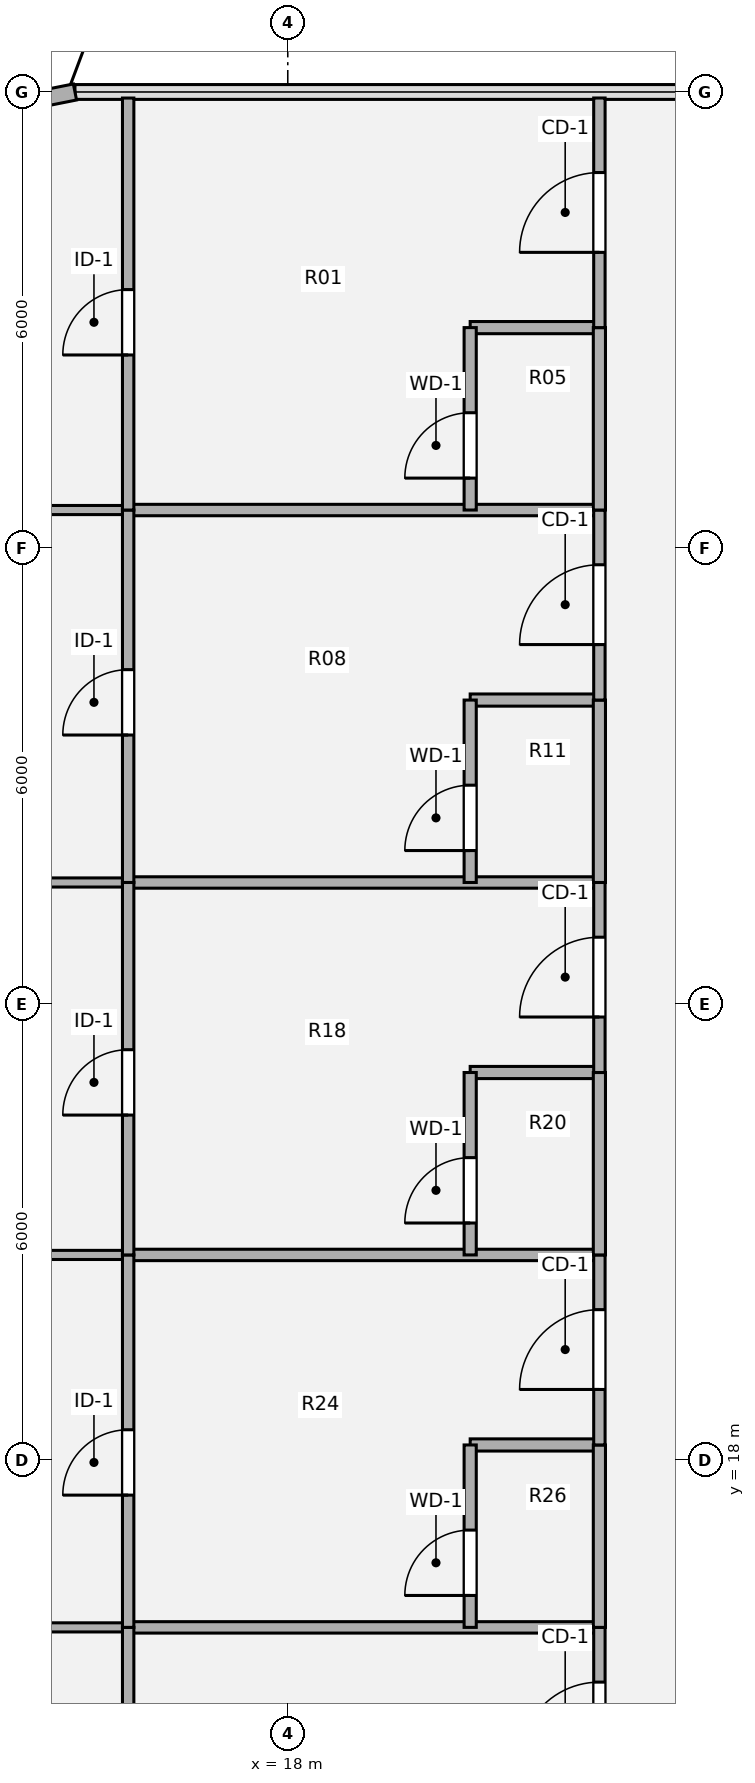
"""IFC4 building model, lengths in metres.
Left out: names, types, materials, properties, quantities, classifications, styles, units other than length and angle.
Written with IfcOpenShell. Run it as: python <this file> out.ifc"""

import sys

from ifc_helpers import new_model, si_unit, direction, frame, frame_2d, origin, origin_2d, place, context, subcontext, project, spatial, rectangle, extrude, source, transform, mapped, element, fill, save


model = new_model("IFC4")
c1 = context("Model", 3, precision=1e-05, world=origin(), true_north=direction((0.0, 1.0)))
c2 = subcontext(c1, "Body", "Model", "MODEL_VIEW")
j1 = project(units=[si_unit("LENGTHUNIT", "METRE"), si_unit("PLANEANGLEUNIT", "RADIAN")], contexts=[c1])
p1 = place(None, origin())
s1 = spatial("IfcSite", under=j1, at=p1, CompositionType="ELEMENT")
p2 = place(p1, origin())
s2 = spatial("IfcBuilding", under=s1, at=p2, CompositionType="ELEMENT")
p3 = place(p2, frame((0.0, 0.0, 68.58)))
s3 = spatial("IfcBuildingStorey", under=s2, at=p3, CompositionType="ELEMENT", Elevation=68.58)
p4 = place(p3, frame((13.975, 35.756, 0.0), z_axis=(0.0, 0.0, 1.0), x_axis=(0.980775717779, 0.195138390419, 0.0)))
e1 = element("IfcWall", 1, at=p4, inside=s3, PredefinedType="SOLIDWALL", context=c2, shape_type="SweptSolid", body=[
    extrude(rectangle(XDim=1.249, YDim=0.215, at=frame_2d((0.624, 0.0))), origin(), (0.0, 0.0, 1.0), 3.53),
])
p5 = place(p3, frame((12.08, 15.8, 0.0), z_axis=(0.0, 0.0, 1.0), x_axis=(1.0, 0.0, 0.0)))
e2 = element("IfcWall", 2, at=p5, inside=s3, PredefinedType="PARTITIONING", context=c2, shape_type="SweptSolid", body=[
    extrude(rectangle(XDim=3.82, YDim=0.12, at=frame_2d((1.91, 0.0))), origin(), (0.0, 0.0, 1.0), 3.5),
])
p6 = place(p3, frame((15.9, 15.8, 0.0), z_axis=(0.0, 0.0, 1.0), x_axis=(1.0, 0.0, 0.0)))
e3 = element("IfcWall", 3, at=p6, inside=s3, PredefinedType="PARTITIONING", context=c2, shape_type="SweptSolid", body=[
    extrude(rectangle(XDim=6.2, YDim=0.15, at=frame_2d((3.1, 0.0))), origin(), (0.0, 0.0, 1.0), 3.5),
])
p7 = place(p3, frame((20.4, 18.2, 0.0), z_axis=(0.0, 0.0, 1.0), x_axis=(1.0, 0.0, 0.0)))
e4 = element("IfcWall", 4, at=p7, inside=s3, PredefinedType="PLUMBINGWALL", context=c2, shape_type="SweptSolid", body=[
    extrude(rectangle(XDim=1.7, YDim=0.16, at=frame_2d((0.85, 0.0))), origin(), (0.0, 0.0, 1.0), 2.715),
])
p8 = place(p3, frame((12.08, 20.7, 0.0), z_axis=(0.0, 0.0, 1.0), x_axis=(1.0, 0.0, 0.0)))
e5 = element("IfcWall", 5, at=p8, inside=s3, PredefinedType="PARTITIONING", context=c2, shape_type="SweptSolid", body=[
    extrude(rectangle(XDim=3.82, YDim=0.12, at=frame_2d((1.91, 0.0))), origin(), (0.0, 0.0, 1.0), 2.982),
])
p9 = place(p3, frame((15.9, 20.7, 0.0), z_axis=(0.0, 0.0, 1.0), x_axis=(1.0, 0.0, 0.0)))
e6 = element("IfcWall", 6, at=p9, inside=s3, PredefinedType="PARTITIONING", context=c2, shape_type="SweptSolid", body=[
    extrude(rectangle(XDim=6.2, YDim=0.15, at=frame_2d((3.1, 0.0))), origin(), (0.0, 0.0, 1.0), 2.982),
])
p10 = place(p3, frame((20.4, 23.1, 0.0), z_axis=(0.0, 0.0, 1.0), x_axis=(1.0, 0.0, 0.0)))
e7 = element("IfcWall", 7, at=p10, inside=s3, PredefinedType="PLUMBINGWALL", context=c2, shape_type="SweptSolid", body=[
    extrude(rectangle(XDim=1.7, YDim=0.16, at=frame_2d((0.85, 0.0))), origin(), (0.0, 0.0, 1.0), 3.055),
])
p11 = place(p3, frame((12.08, 25.6, 0.0), z_axis=(0.0, 0.0, 1.0), x_axis=(1.0, 0.0, 0.0)))
e8 = element("IfcWall", 8, at=p11, inside=s3, PredefinedType="PARTITIONING", context=c2, shape_type="SweptSolid", body=[
    extrude(rectangle(XDim=3.82, YDim=0.12, at=frame_2d((1.91, 0.0))), origin(), (0.0, 0.0, 1.0), 2.982),
])
p12 = place(p3, frame((15.9, 25.6, 0.0), z_axis=(0.0, 0.0, 1.0), x_axis=(1.0, 0.0, 0.0)))
e9 = element("IfcWall", 9, at=p12, inside=s3, PredefinedType="PARTITIONING", context=c2, shape_type="SweptSolid", body=[
    extrude(rectangle(XDim=6.2, YDim=0.15, at=frame_2d((3.1, 0.0))), origin(), (0.0, 0.0, 1.0), 2.982),
])
p13 = place(p3, frame((20.4, 28.0, 0.0), z_axis=(0.0, 0.0, 1.0), x_axis=(1.0, 0.0, 0.0)))
e10 = element("IfcWall", 10, at=p13, inside=s3, PredefinedType="PLUMBINGWALL", context=c2, shape_type="SweptSolid", body=[
    extrude(rectangle(XDim=1.7, YDim=0.16, at=frame_2d((0.85, 0.0))), origin(), (0.0, 0.0, 1.0), 2.982),
])
p14 = place(p3, frame((12.08, 30.5, 0.0), z_axis=(0.0, 0.0, 1.0), x_axis=(1.0, 0.0, 0.0)))
e11 = element("IfcWall", 11, at=p14, inside=s3, PredefinedType="PARTITIONING", context=c2, shape_type="SweptSolid", body=[
    extrude(rectangle(XDim=3.82, YDim=0.12, at=frame_2d((1.91, 0.0))), origin(), (0.0, 0.0, 1.0), 2.903),
])
p15 = place(p3, frame((15.9, 30.5, 0.0), z_axis=(0.0, 0.0, 1.0), x_axis=(1.0, 0.0, 0.0)))
e12 = element("IfcWall", 12, at=p15, inside=s3, PredefinedType="PARTITIONING", context=c2, shape_type="SweptSolid", body=[
    extrude(rectangle(XDim=6.2, YDim=0.15, at=frame_2d((3.1, 0.0))), origin(), (0.0, 0.0, 1.0), 2.903),
])
p16 = place(p3, frame((20.4, 32.9, 0.0), z_axis=(0.0, 0.0, 1.0), x_axis=(1.0, 0.0, 0.0)))
e13 = element("IfcWall", 13, at=p16, inside=s3, PredefinedType="PLUMBINGWALL", context=c2, shape_type="SweptSolid", body=[
    extrude(rectangle(XDim=1.7, YDim=0.16, at=frame_2d((0.85, 0.0))), origin(), (0.0, 0.0, 1.0), 3.055),
])
p17 = place(p3, frame((15.9, 10.9, 0.0), z_axis=(0.0, 0.0, 1.0), x_axis=(0.0, 1.0, 0.0)))
e14 = element("IfcWall", 14, at=p17, inside=s3, PredefinedType="PARTITIONING", context=c2, shape_type="SweptSolid", body=[
    extrude(rectangle(XDim=4.9, YDim=0.15, at=frame_2d((2.45, 0.0))), origin(), (0.0, 0.0, 1.0), 3.5),
])
p18 = place(p17, frame((1.64, 0.0, 0.0)))
e15 = element("IfcOpeningElement", 15, at=p18, cuts=e14, PredefinedType="OPENING", context=c2, shape_type="SweptSolid", body=[
    extrude(rectangle(XDim=0.86, YDim=2.1, at=origin_2d()), frame((0.43, 0.085, 1.05), z_axis=(0.0, -1.0, 0.0), x_axis=(1.0, 0.0, 0.0)), (0.0, 0.0, 1.0), 0.17),
])
p19 = place(p3, frame((15.9, 15.8, 0.0), z_axis=(0.0, 0.0, 1.0), x_axis=(0.0, 1.0, 0.0)))
e16 = element("IfcWall", 16, at=p19, inside=s3, PredefinedType="PARTITIONING", context=c2, shape_type="SweptSolid", body=[
    extrude(rectangle(XDim=4.9, YDim=0.15, at=frame_2d((2.45, 0.0))), origin(), (0.0, 0.0, 1.0), 3.5),
])
p20 = place(p19, frame((1.74, 0.0, 0.0)))
e17 = element("IfcOpeningElement", 17, at=p20, cuts=e16, PredefinedType="OPENING", context=c2, shape_type="SweptSolid", body=[
    extrude(rectangle(XDim=0.86, YDim=2.1, at=origin_2d()), frame((0.43, 0.085, 1.05), z_axis=(0.0, -1.0, 0.0), x_axis=(1.0, 0.0, 0.0)), (0.0, 0.0, 1.0), 0.17),
])
p21 = place(p3, frame((15.9, 20.7, 0.0), z_axis=(0.0, 0.0, 1.0), x_axis=(0.0, 1.0, 0.0)))
e18 = element("IfcWall", 18, at=p21, inside=s3, PredefinedType="PARTITIONING", context=c2, shape_type="SweptSolid", body=[
    extrude(rectangle(XDim=4.9, YDim=0.15, at=frame_2d((2.45, 0.0))), origin(), (0.0, 0.0, 1.0), 3.5),
])
p22 = place(p21, frame((1.84, 0.0, 0.0)))
e19 = element("IfcOpeningElement", 19, at=p22, cuts=e18, PredefinedType="OPENING", context=c2, shape_type="SweptSolid", body=[
    extrude(rectangle(XDim=0.86, YDim=2.1, at=origin_2d()), frame((0.43, 0.085, 1.05), z_axis=(0.0, -1.0, 0.0), x_axis=(1.0, 0.0, 0.0)), (0.0, 0.0, 1.0), 0.17),
])
p23 = place(p3, frame((15.9, 25.6, 0.0), z_axis=(0.0, 0.0, 1.0), x_axis=(0.0, 1.0, 0.0)))
e20 = element("IfcWall", 20, at=p23, inside=s3, PredefinedType="PARTITIONING", context=c2, shape_type="SweptSolid", body=[
    extrude(rectangle(XDim=4.9, YDim=0.15, at=frame_2d((2.45, 0.0))), origin(), (0.0, 0.0, 1.0), 3.5),
])
p24 = place(p23, frame((1.94, 0.0, 0.0)))
e21 = element("IfcOpeningElement", 21, at=p24, cuts=e20, PredefinedType="OPENING", context=c2, shape_type="SweptSolid", body=[
    extrude(rectangle(XDim=0.86, YDim=2.1, at=origin_2d()), frame((0.43, 0.085, 1.05), z_axis=(0.0, -1.0, 0.0), x_axis=(1.0, 0.0, 0.0)), (0.0, 0.0, 1.0), 0.17),
])
p25 = place(p3, frame((15.9, 30.5, 0.0), z_axis=(0.0, 0.0, 1.0), x_axis=(0.0, 1.0, 0.0)))
e22 = element("IfcWall", 22, at=p25, inside=s3, PredefinedType="PARTITIONING", context=c2, shape_type="SweptSolid", body=[
    extrude(rectangle(XDim=5.42, YDim=0.15, at=frame_2d((2.71, 0.0))), origin(), (0.0, 0.0, 1.0), 3.5),
])
p26 = place(p25, frame((2.04, 0.0, 0.0)))
e23 = element("IfcOpeningElement", 23, at=p26, cuts=e22, PredefinedType="OPENING", context=c2, shape_type="SweptSolid", body=[
    extrude(rectangle(XDim=0.86, YDim=2.1, at=origin_2d()), frame((0.43, 0.085, 1.05), z_axis=(0.0, -1.0, 0.0), x_axis=(1.0, 0.0, 0.0)), (0.0, 0.0, 1.0), 0.17),
])
p27 = place(p3, frame((20.4, 15.8, 0.0), z_axis=(0.0, 0.0, 1.0), x_axis=(0.0, 1.0, 0.0)))
e24 = element("IfcWall", 24, at=p27, inside=s3, PredefinedType="PLUMBINGWALL", context=c2, shape_type="SweptSolid", body=[
    extrude(rectangle(XDim=2.4, YDim=0.16, at=frame_2d((1.2, 0.0))), origin(), (0.0, 0.0, 1.0), 3.5),
])
p28 = place(p27, frame((0.42, 0.0, 0.0)))
e25 = element("IfcOpeningElement", 25, at=p28, cuts=e24, PredefinedType="OPENING", context=c2, shape_type="SweptSolid", body=[
    extrude(rectangle(XDim=0.86, YDim=2.1, at=origin_2d()), frame((0.43, 0.09, 1.05), z_axis=(0.0, -1.0, 0.0), x_axis=(1.0, 0.0, 0.0)), (0.0, 0.0, 1.0), 0.18),
])
p29 = place(p3, frame((20.4, 20.7, 0.0), z_axis=(0.0, 0.0, 1.0), x_axis=(0.0, 1.0, 0.0)))
e26 = element("IfcWall", 26, at=p29, inside=s3, PredefinedType="PLUMBINGWALL", context=c2, shape_type="SweptSolid", body=[
    extrude(rectangle(XDim=2.4, YDim=0.16, at=frame_2d((1.2, 0.0))), origin(), (0.0, 0.0, 1.0), 3.5),
])
p30 = place(p29, frame((0.42, 0.0, 0.0)))
e27 = element("IfcOpeningElement", 27, at=p30, cuts=e26, PredefinedType="OPENING", context=c2, shape_type="SweptSolid", body=[
    extrude(rectangle(XDim=0.86, YDim=2.1, at=origin_2d()), frame((0.43, 0.09, 1.05), z_axis=(0.0, -1.0, 0.0), x_axis=(1.0, 0.0, 0.0)), (0.0, 0.0, 1.0), 0.18),
])
p31 = place(p3, frame((20.4, 25.6, 0.0), z_axis=(0.0, 0.0, 1.0), x_axis=(0.0, 1.0, 0.0)))
e28 = element("IfcWall", 28, at=p31, inside=s3, PredefinedType="PLUMBINGWALL", context=c2, shape_type="SweptSolid", body=[
    extrude(rectangle(XDim=2.4, YDim=0.16, at=frame_2d((1.2, 0.0))), origin(), (0.0, 0.0, 1.0), 3.5),
])
p32 = place(p31, frame((0.42, 0.0, 0.0)))
e29 = element("IfcOpeningElement", 29, at=p32, cuts=e28, PredefinedType="OPENING", context=c2, shape_type="SweptSolid", body=[
    extrude(rectangle(XDim=0.86, YDim=2.1, at=origin_2d()), frame((0.43, 0.09, 1.05), z_axis=(0.0, -1.0, 0.0), x_axis=(1.0, 0.0, 0.0)), (0.0, 0.0, 1.0), 0.18),
])
p33 = place(p3, frame((20.4, 30.5, 0.0), z_axis=(0.0, 0.0, 1.0), x_axis=(0.0, 1.0, 0.0)))
e30 = element("IfcWall", 30, at=p33, inside=s3, PredefinedType="PLUMBINGWALL", context=c2, shape_type="SweptSolid", body=[
    extrude(rectangle(XDim=2.4, YDim=0.16, at=frame_2d((1.2, 0.0))), origin(), (0.0, 0.0, 1.0), 3.5),
])
p34 = place(p33, frame((0.42, 0.0, 0.0)))
e31 = element("IfcOpeningElement", 31, at=p34, cuts=e30, PredefinedType="OPENING", context=c2, shape_type="SweptSolid", body=[
    extrude(rectangle(XDim=0.86, YDim=2.1, at=origin_2d()), frame((0.43, 0.09, 1.05), z_axis=(0.0, -1.0, 0.0), x_axis=(1.0, 0.0, 0.0)), (0.0, 0.0, 1.0), 0.18),
])
p35 = place(p3, frame((22.1, 13.3, 0.0), z_axis=(0.0, 0.0, 1.0), x_axis=(0.0, 1.0, 0.0)))
e32 = element("IfcWall", 32, at=p35, inside=s3, PredefinedType="PARTITIONING", context=c2, shape_type="SweptSolid", body=[
    extrude(rectangle(XDim=2.5, YDim=0.15, at=frame_2d((1.25, 0.0))), origin(), (0.0, 0.0, 1.0), 3.5),
])
p36 = place(p35, frame((0.73, 0.0, 0.0)))
e33 = element("IfcOpeningElement", 33, at=p36, cuts=e32, PredefinedType="OPENING", context=c2, shape_type="SweptSolid", body=[
    extrude(rectangle(XDim=1.05, YDim=2.1, at=origin_2d()), frame((0.525, 0.085, 1.05), z_axis=(0.0, -1.0, 0.0), x_axis=(1.0, 0.0, 0.0)), (0.0, 0.0, 1.0), 0.17),
])
p37 = place(p3, frame((22.1, 15.8, 0.0), z_axis=(0.0, 0.0, 1.0), x_axis=(0.0, 1.0, 0.0)))
e34 = element("IfcWall", 34, at=p37, inside=s3, PredefinedType="PLUMBINGWALL", context=c2, shape_type="SweptSolid", body=[
    extrude(rectangle(XDim=2.4, YDim=0.16, at=frame_2d((1.2, 0.0))), origin(), (0.0, 0.0, 1.0), 3.5),
])
p38 = place(p3, frame((22.1, 18.2, 0.0), z_axis=(0.0, 0.0, 1.0), x_axis=(0.0, 1.0, 0.0)))
e35 = element("IfcWall", 35, at=p38, inside=s3, PredefinedType="PARTITIONING", context=c2, shape_type="SweptSolid", body=[
    extrude(rectangle(XDim=2.5, YDim=0.15, at=frame_2d((1.25, 0.0))), origin(), (0.0, 0.0, 1.0), 3.5),
])
p39 = place(p38, frame((0.73, 0.0, 0.0)))
e36 = element("IfcOpeningElement", 36, at=p39, cuts=e35, PredefinedType="OPENING", context=c2, shape_type="SweptSolid", body=[
    extrude(rectangle(XDim=1.05, YDim=2.1, at=origin_2d()), frame((0.525, 0.085, 1.05), z_axis=(0.0, -1.0, 0.0), x_axis=(1.0, 0.0, 0.0)), (0.0, 0.0, 1.0), 0.17),
])
p40 = place(p3, frame((22.1, 20.7, 0.0), z_axis=(0.0, 0.0, 1.0), x_axis=(0.0, 1.0, 0.0)))
e37 = element("IfcWall", 37, at=p40, inside=s3, PredefinedType="PLUMBINGWALL", context=c2, shape_type="SweptSolid", body=[
    extrude(rectangle(XDim=2.4, YDim=0.16, at=frame_2d((1.2, 0.0))), origin(), (0.0, 0.0, 1.0), 3.5),
])
p41 = place(p3, frame((22.1, 23.1, 0.0), z_axis=(0.0, 0.0, 1.0), x_axis=(0.0, 1.0, 0.0)))
e38 = element("IfcWall", 38, at=p41, inside=s3, PredefinedType="PARTITIONING", context=c2, shape_type="SweptSolid", body=[
    extrude(rectangle(XDim=2.5, YDim=0.15, at=frame_2d((1.25, 0.0))), origin(), (0.0, 0.0, 1.0), 3.5),
])
p42 = place(p41, frame((0.73, 0.0, 0.0)))
e39 = element("IfcOpeningElement", 39, at=p42, cuts=e38, PredefinedType="OPENING", context=c2, shape_type="SweptSolid", body=[
    extrude(rectangle(XDim=1.05, YDim=2.1, at=origin_2d()), frame((0.525, 0.085, 1.05), z_axis=(0.0, -1.0, 0.0), x_axis=(1.0, 0.0, 0.0)), (0.0, 0.0, 1.0), 0.17),
])
p43 = place(p3, frame((22.1, 25.6, 0.0), z_axis=(0.0, 0.0, 1.0), x_axis=(0.0, 1.0, 0.0)))
e40 = element("IfcWall", 40, at=p43, inside=s3, PredefinedType="PLUMBINGWALL", context=c2, shape_type="SweptSolid", body=[
    extrude(rectangle(XDim=2.4, YDim=0.16, at=frame_2d((1.2, 0.0))), origin(), (0.0, 0.0, 1.0), 3.5),
])
p44 = place(p3, frame((22.1, 28.0, 0.0), z_axis=(0.0, 0.0, 1.0), x_axis=(0.0, 1.0, 0.0)))
e41 = element("IfcWall", 41, at=p44, inside=s3, PredefinedType="PARTITIONING", context=c2, shape_type="SweptSolid", body=[
    extrude(rectangle(XDim=2.5, YDim=0.15, at=frame_2d((1.25, 0.0))), origin(), (0.0, 0.0, 1.0), 3.5),
])
p45 = place(p44, frame((0.73, 0.0, 0.0)))
e42 = element("IfcOpeningElement", 42, at=p45, cuts=e41, PredefinedType="OPENING", context=c2, shape_type="SweptSolid", body=[
    extrude(rectangle(XDim=1.05, YDim=2.1, at=origin_2d()), frame((0.525, 0.085, 1.05), z_axis=(0.0, -1.0, 0.0), x_axis=(1.0, 0.0, 0.0)), (0.0, 0.0, 1.0), 0.17),
])
p46 = place(p3, frame((22.1, 30.5, 0.0), z_axis=(0.0, 0.0, 1.0), x_axis=(0.0, 1.0, 0.0)))
e43 = element("IfcWall", 43, at=p46, inside=s3, PredefinedType="PLUMBINGWALL", context=c2, shape_type="SweptSolid", body=[
    extrude(rectangle(XDim=2.4, YDim=0.16, at=frame_2d((1.2, 0.0))), origin(), (0.0, 0.0, 1.0), 3.5),
])
p47 = place(p3, frame((22.1, 32.9, 0.0), z_axis=(0.0, 0.0, 1.0), x_axis=(0.0, 1.0, 0.0)))
e44 = element("IfcWall", 44, at=p47, inside=s3, PredefinedType="PARTITIONING", context=c2, shape_type="SweptSolid", body=[
    extrude(rectangle(XDim=3.021, YDim=0.15, at=frame_2d((1.51, 0.0))), origin(), (0.0, 0.0, 1.0), 3.5),
])
p48 = place(p47, frame((0.99, 0.0, 0.0)))
e45 = element("IfcOpeningElement", 45, at=p48, cuts=e44, PredefinedType="OPENING", context=c2, shape_type="SweptSolid", body=[
    extrude(rectangle(XDim=1.05, YDim=2.1, at=origin_2d()), frame((0.525, 0.085, 1.05), z_axis=(0.0, -1.0, 0.0), x_axis=(1.0, 0.0, 0.0)), (0.0, 0.0, 1.0), 0.17),
])
m1 = source(origin(), c2, "Body", "SweptSolid", [
    extrude(rectangle(XDim=0.86, YDim=2.1, at=origin_2d()), frame((0.43, 0.025, 1.05), z_axis=(0.0, -1.0, 0.0), x_axis=(1.0, 0.0, 0.0)), (0.0, 0.0, 1.0), 0.05),
])
p49 = place(p20, origin())
e46 = element("IfcDoor", 46, at=p49, inside=s3, OperationType="SINGLE_SWING_LEFT", PredefinedType="DOOR", context=c2, shape_type="MappedRepresentation", body=[
    mapped(m1, transform((0.0, 0.0, 0.0), x_axis=(1.0, 0.0, 0.0), y_axis=(0.0, 1.0, 0.0), z_axis=(0.0, 0.0, 1.0), scale=1.0)),
])
fill(e17, e46)
p50 = place(p22, origin())
e47 = element("IfcDoor", 47, at=p50, inside=s3, OperationType="SINGLE_SWING_LEFT", PredefinedType="DOOR", context=c2, shape_type="MappedRepresentation", body=[
    mapped(m1, transform((0.0, 0.0, 0.0), x_axis=(1.0, 0.0, 0.0), y_axis=(0.0, 1.0, 0.0), z_axis=(0.0, 0.0, 1.0), scale=1.0)),
])
fill(e19, e47)
p51 = place(p24, origin())
e48 = element("IfcDoor", 48, at=p51, inside=s3, OperationType="SINGLE_SWING_LEFT", PredefinedType="DOOR", context=c2, shape_type="MappedRepresentation", body=[
    mapped(m1, transform((0.0, 0.0, 0.0), x_axis=(1.0, 0.0, 0.0), y_axis=(0.0, 1.0, 0.0), z_axis=(0.0, 0.0, 1.0), scale=1.0)),
])
fill(e21, e48)
p52 = place(p26, origin())
e49 = element("IfcDoor", 49, at=p52, inside=s3, OperationType="SINGLE_SWING_LEFT", PredefinedType="DOOR", context=c2, shape_type="MappedRepresentation", body=[
    mapped(m1, transform((0.0, 0.0, 0.0), x_axis=(1.0, 0.0, 0.0), y_axis=(0.0, 1.0, 0.0), z_axis=(0.0, 0.0, 1.0), scale=1.0)),
])
fill(e23, e49)
m2 = source(origin(), c2, "Body", "SweptSolid", [
    extrude(rectangle(XDim=0.86, YDim=2.1, at=origin_2d()), frame((0.43, 0.025, 1.05), z_axis=(0.0, -1.0, 0.0), x_axis=(1.0, 0.0, 0.0)), (0.0, 0.0, 1.0), 0.05),
])
p53 = place(p28, origin())
e50 = element("IfcDoor", 50, at=p53, inside=s3, OperationType="SINGLE_SWING_LEFT", PredefinedType="DOOR", context=c2, shape_type="MappedRepresentation", body=[
    mapped(m2, transform((0.0, 0.0, 0.0), x_axis=(1.0, 0.0, 0.0), y_axis=(0.0, 1.0, 0.0), z_axis=(0.0, 0.0, 1.0), scale=1.0)),
])
fill(e25, e50)
p54 = place(p30, origin())
e51 = element("IfcDoor", 51, at=p54, inside=s3, OperationType="SINGLE_SWING_LEFT", PredefinedType="DOOR", context=c2, shape_type="MappedRepresentation", body=[
    mapped(m2, transform((0.0, 0.0, 0.0), x_axis=(1.0, 0.0, 0.0), y_axis=(0.0, 1.0, 0.0), z_axis=(0.0, 0.0, 1.0), scale=1.0)),
])
fill(e27, e51)
p55 = place(p32, origin())
e52 = element("IfcDoor", 52, at=p55, inside=s3, OperationType="SINGLE_SWING_LEFT", PredefinedType="DOOR", context=c2, shape_type="MappedRepresentation", body=[
    mapped(m2, transform((0.0, 0.0, 0.0), x_axis=(1.0, 0.0, 0.0), y_axis=(0.0, 1.0, 0.0), z_axis=(0.0, 0.0, 1.0), scale=1.0)),
])
fill(e29, e52)
p56 = place(p34, origin())
e53 = element("IfcDoor", 53, at=p56, inside=s3, OperationType="SINGLE_SWING_LEFT", PredefinedType="DOOR", context=c2, shape_type="MappedRepresentation", body=[
    mapped(m2, transform((0.0, 0.0, 0.0), x_axis=(1.0, 0.0, 0.0), y_axis=(0.0, 1.0, 0.0), z_axis=(0.0, 0.0, 1.0), scale=1.0)),
])
fill(e31, e53)
m3 = source(origin(), c2, "Body", "SweptSolid", [
    extrude(rectangle(XDim=1.05, YDim=2.1, at=origin_2d()), frame((0.525, 0.025, 1.05), z_axis=(0.0, -1.0, 0.0), x_axis=(1.0, 0.0, 0.0)), (0.0, 0.0, 1.0), 0.05),
])
p57 = place(p36, origin())
e54 = element("IfcDoor", 54, at=p57, inside=s3, OperationType="SINGLE_SWING_LEFT", PredefinedType="DOOR", context=c2, shape_type="MappedRepresentation", body=[
    mapped(m3, transform((0.0, 0.0, 0.0), x_axis=(1.0, 0.0, 0.0), y_axis=(0.0, 1.0, 0.0), z_axis=(0.0, 0.0, 1.0), scale=1.0)),
])
fill(e33, e54)
p58 = place(p39, origin())
e55 = element("IfcDoor", 55, at=p58, inside=s3, OperationType="SINGLE_SWING_LEFT", PredefinedType="DOOR", context=c2, shape_type="MappedRepresentation", body=[
    mapped(m3, transform((0.0, 0.0, 0.0), x_axis=(1.0, 0.0, 0.0), y_axis=(0.0, 1.0, 0.0), z_axis=(0.0, 0.0, 1.0), scale=1.0)),
])
fill(e36, e55)
p59 = place(p42, origin())
e56 = element("IfcDoor", 56, at=p59, inside=s3, OperationType="SINGLE_SWING_LEFT", PredefinedType="DOOR", context=c2, shape_type="MappedRepresentation", body=[
    mapped(m3, transform((0.0, 0.0, 0.0), x_axis=(1.0, 0.0, 0.0), y_axis=(0.0, 1.0, 0.0), z_axis=(0.0, 0.0, 1.0), scale=1.0)),
])
fill(e39, e56)
p60 = place(p45, origin())
e57 = element("IfcDoor", 57, at=p60, inside=s3, OperationType="SINGLE_SWING_LEFT", PredefinedType="DOOR", context=c2, shape_type="MappedRepresentation", body=[
    mapped(m3, transform((0.0, 0.0, 0.0), x_axis=(1.0, 0.0, 0.0), y_axis=(0.0, 1.0, 0.0), z_axis=(0.0, 0.0, 1.0), scale=1.0)),
])
fill(e42, e57)
p61 = place(p48, origin())
e58 = element("IfcDoor", 58, at=p61, inside=s3, OperationType="SINGLE_SWING_LEFT", PredefinedType="DOOR", context=c2, shape_type="MappedRepresentation", body=[
    mapped(m3, transform((0.0, 0.0, 0.0), x_axis=(1.0, 0.0, 0.0), y_axis=(0.0, 1.0, 0.0), z_axis=(0.0, 0.0, 1.0), scale=1.0)),
])
fill(e45, e58)
save(model, sys.argv[1])
